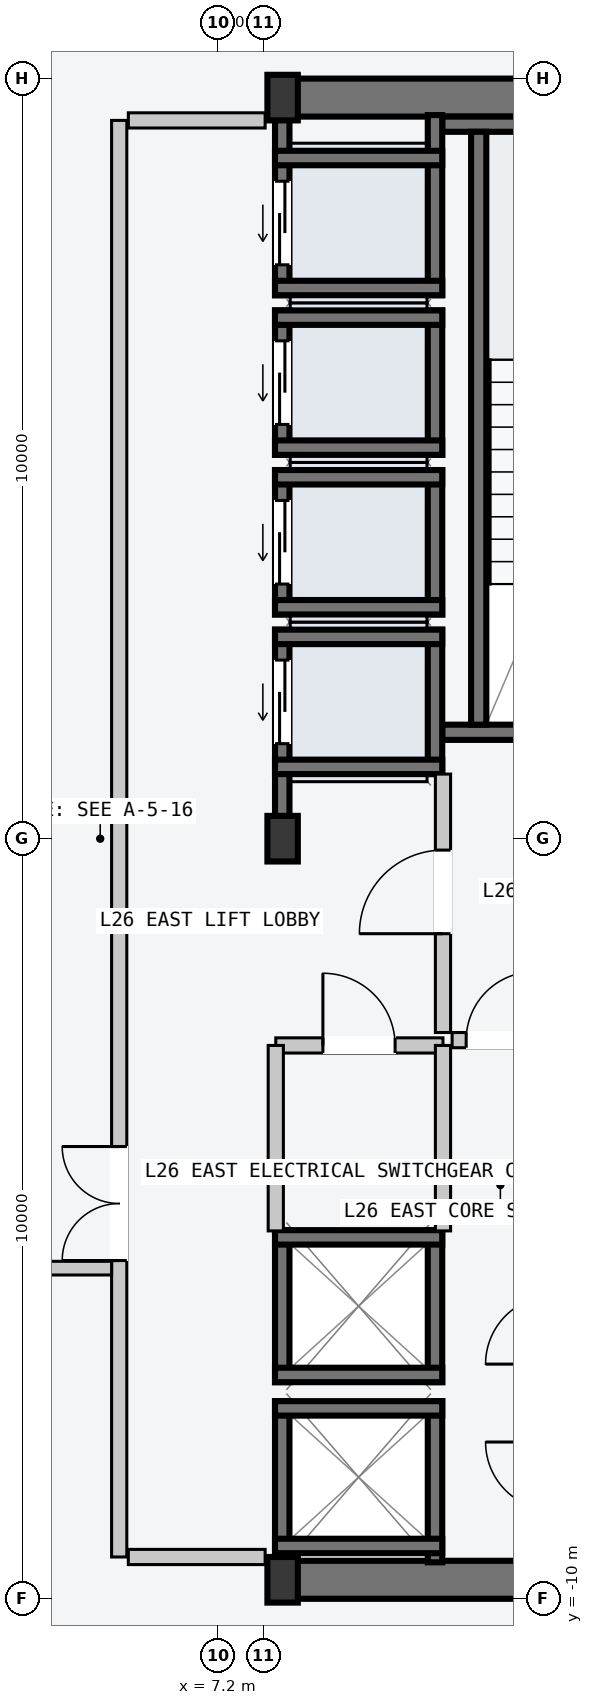
"""IFC4 building model, lengths in metres.
Left out: names, types, materials, properties, quantities, classifications, styles, units other than length and angle.
Written with IfcOpenShell. Run it as: python <this file> out.ifc"""

import sys

from ifc_helpers import new_model, si_unit, direction, frame, frame_2d, origin, origin_2d, place, context, subcontext, project, spatial, rectangle, i_section, extrude, element, fill, save


model = new_model("IFC4")
c1 = context("Model", 3, precision=1e-05, world=origin(), true_north=direction((0.0, 1.0)))
c2 = subcontext(c1, "Body", "Model", "MODEL_VIEW")
j1 = project(units=[si_unit("LENGTHUNIT", "METRE"), si_unit("PLANEANGLEUNIT", "RADIAN")], contexts=[c1])
p1 = place(None, origin())
s1 = spatial("IfcSite", under=j1, at=p1, CompositionType="ELEMENT")
p2 = place(p1, origin())
s2 = spatial("IfcBuilding", under=s1, at=p2, CompositionType="ELEMENT")
p3 = place(p2, frame((0.0, 0.0, 102.6)))
s3 = spatial("IfcBuildingStorey", under=s2, at=p3, CompositionType="ELEMENT", Elevation=102.6)
for number, where, z_axis, x_axis in (
    (1, (8.07, -9.75, -0.2), (0.0, 0.0, 1.0), (1.0, 0.0, 0.0)),
    (2, (8.07, 9.75, -0.2), (0.0, 0.0, 1.0), (1.0, 0.0, 0.0)),
):
    element("IfcWall", number, at=place(p3, frame(where, z_axis=z_axis, x_axis=x_axis)), inside=s3, PredefinedType="SHEAR", context=c2, shape_type="SweptSolid", body=[
        extrude(rectangle(XDim=6.46, YDim=0.5, at=frame_2d((3.23, 0.0))), origin(), (0.0, 0.0, 1.0), 3.6),
    ])
p4 = place(p3, frame((10.15, 1.4, -0.2), z_axis=(0.0, 0.0, 1.0), x_axis=(1.0, 0.0, 0.0)))
e3 = element("IfcWall", 3, at=p4, inside=s3, PredefinedType="SOLIDWALL", context=c2, shape_type="SweptSolid", body=[
    extrude(rectangle(XDim=4.1, YDim=0.2, at=frame_2d((2.05, 0.0))), origin(), (0.0, 0.0, 1.0), 3.6),
])
p5 = place(p4, frame((1.5, 0.0, 0.2)))
e4 = element("IfcOpeningElement", 4, at=p5, cuts=e3, PredefinedType="OPENING", context=c2, shape_type="SweptSolid", body=[
    extrude(rectangle(XDim=1.12, YDim=2.18, at=frame_2d((0.56, 1.09))), frame((0.0, 0.11, 0.0), z_axis=(0.0, -1.0, 0.0), x_axis=(1.0, 0.0, 0.0)), (0.0, 0.0, 1.0), 0.22),
])
p6 = place(p3, frame((10.15, 9.4, -0.2), z_axis=(0.0, 0.0, 1.0), x_axis=(1.0, 0.0, 0.0)))
e5 = element("IfcWall", 5, at=p6, inside=s3, PredefinedType="SOLIDWALL", context=c2, shape_type="SweptSolid", body=[
    extrude(rectangle(XDim=4.1, YDim=0.2, at=frame_2d((2.05, 0.0))), origin(), (0.0, 0.0, 1.0), 3.6),
])
p7 = place(p3, frame((10.63, 1.5, -0.2), z_axis=(0.0, 0.0, 1.0), x_axis=(0.0, 1.0, 0.0)))
e6 = element("IfcWall", 6, at=p7, inside=s3, PredefinedType="SOLIDWALL", context=c2, shape_type="SweptSolid", body=[
    extrude(rectangle(XDim=7.8, YDim=0.2, at=frame_2d((3.9, 0.0))), origin(), (0.0, 0.0, 1.0), 3.6),
])
for number, where, z_axis, x_axis in (
    (7, (8.05, -9.75, 0.0), (0.0, 0.0, 1.0), (1.0, 0.0, 0.0)),
    (8, (8.05, 0.0, 0.0), (0.0, 0.0, 1.0), (1.0, 0.0, 0.0)),
    (9, (8.05, 9.75, 0.0), (0.0, 0.0, 1.0), (1.0, 0.0, 0.0)),
):
    element("IfcColumn", number, at=place(p3, frame(where, z_axis=z_axis, x_axis=x_axis)), inside=s3, PredefinedType="COLUMN", context=c2, shape_type="SweptSolid", body=[
        extrude(i_section(OverallWidth=0.4, OverallDepth=0.6, WebThickness=0.022, FlangeThickness=0.036, at=origin_2d()), origin(), (0.0, 0.0, 1.0), 3.6),
    ])
p8 = place(p3, frame((8.045, 0.21, -0.2), z_axis=(0.0, 0.0, 1.0), x_axis=(0.0, 1.0, 0.0)))
e10 = element("IfcWall", 10, at=p8, inside=s3, PredefinedType="SOLIDWALL", context=c2, shape_type="SweptSolid", body=[
    extrude(rectangle(XDim=2.54, YDim=0.19, at=frame_2d((1.27, 0.0))), origin(), (0.0, 0.0, 1.0), 3.6),
])
p9 = place(p8, frame((1.04, 0.0, 0.2)))
e11 = element("IfcOpeningElement", 11, at=p9, cuts=e10, PredefinedType="OPENING", context=c2, shape_type="SweptSolid", body=[
    extrude(rectangle(XDim=1.1, YDim=2.2, at=frame_2d((0.55, 1.1))), frame((0.0, 0.105, 0.0), z_axis=(0.0, -1.0, 0.0), x_axis=(1.0, 0.0, 0.0)), (0.0, 0.0, 1.0), 0.21),
])
p10 = place(p3, frame((10.055, 0.85, -0.2), z_axis=(0.0, 0.0, 1.0), x_axis=(0.0, 1.0, 0.0)))
e12 = element("IfcWall", 12, at=p10, inside=s3, PredefinedType="SOLIDWALL", context=c2, shape_type="SweptSolid", body=[
    extrude(rectangle(XDim=1.9, YDim=0.19, at=frame_2d((0.95, 0.0))), origin(), (0.0, 0.0, 1.0), 3.6),
])
for number, where, z_axis, x_axis in (
    (13, (7.95, 2.655, -0.2), (0.0, 0.0, 1.0), (1.0, 0.0, 0.0)),
    (14, (7.95, 0.945, -0.2), (0.0, 0.0, 1.0), (1.0, 0.0, 0.0)),
):
    element("IfcWall", number, at=place(p3, frame(where, z_axis=z_axis, x_axis=x_axis)), inside=s3, PredefinedType="SOLIDWALL", context=c2, shape_type="SweptSolid", body=[
        extrude(rectangle(XDim=2.2, YDim=0.19, at=frame_2d((1.1, 0.0))), origin(), (0.0, 0.0, 1.0), 3.6),
    ])
p11 = place(p3, frame((8.045, 2.95, -0.2), z_axis=(0.0, 0.0, 1.0), x_axis=(0.0, 1.0, 0.0)))
e15 = element("IfcWall", 15, at=p11, inside=s3, PredefinedType="SOLIDWALL", context=c2, shape_type="SweptSolid", body=[
    extrude(rectangle(XDim=1.9, YDim=0.19, at=frame_2d((0.95, 0.0))), origin(), (0.0, 0.0, 1.0), 3.6),
])
p12 = place(p11, frame((0.4, 0.0, 0.2)))
e16 = element("IfcOpeningElement", 16, at=p12, cuts=e15, PredefinedType="OPENING", context=c2, shape_type="SweptSolid", body=[
    extrude(rectangle(XDim=1.1, YDim=2.2, at=frame_2d((0.55, 1.1))), frame((0.0, 0.105, 0.0), z_axis=(0.0, -1.0, 0.0), x_axis=(1.0, 0.0, 0.0)), (0.0, 0.0, 1.0), 0.21),
])
p13 = place(p3, frame((10.055, 2.95, -0.2), z_axis=(0.0, 0.0, 1.0), x_axis=(0.0, 1.0, 0.0)))
e17 = element("IfcWall", 17, at=p13, inside=s3, PredefinedType="SOLIDWALL", context=c2, shape_type="SweptSolid", body=[
    extrude(rectangle(XDim=1.9, YDim=0.19, at=frame_2d((0.95, 0.0))), origin(), (0.0, 0.0, 1.0), 3.6),
])
for number, where, z_axis, x_axis in (
    (18, (7.95, 4.755, -0.2), (0.0, 0.0, 1.0), (1.0, 0.0, 0.0)),
    (19, (7.95, 3.045, -0.2), (0.0, 0.0, 1.0), (1.0, 0.0, 0.0)),
):
    element("IfcWall", number, at=place(p3, frame(where, z_axis=z_axis, x_axis=x_axis)), inside=s3, PredefinedType="SOLIDWALL", context=c2, shape_type="SweptSolid", body=[
        extrude(rectangle(XDim=2.2, YDim=0.19, at=frame_2d((1.1, 0.0))), origin(), (0.0, 0.0, 1.0), 3.6),
    ])
p14 = place(p3, frame((8.045, 5.05, -0.2), z_axis=(0.0, 0.0, 1.0), x_axis=(0.0, 1.0, 0.0)))
e20 = element("IfcWall", 20, at=p14, inside=s3, PredefinedType="SOLIDWALL", context=c2, shape_type="SweptSolid", body=[
    extrude(rectangle(XDim=1.9, YDim=0.19, at=frame_2d((0.95, 0.0))), origin(), (0.0, 0.0, 1.0), 3.6),
])
p15 = place(p14, frame((0.4, 0.0, 0.2)))
e21 = element("IfcOpeningElement", 21, at=p15, cuts=e20, PredefinedType="OPENING", context=c2, shape_type="SweptSolid", body=[
    extrude(rectangle(XDim=1.1, YDim=2.2, at=frame_2d((0.55, 1.1))), frame((0.0, 0.105, 0.0), z_axis=(0.0, -1.0, 0.0), x_axis=(1.0, 0.0, 0.0)), (0.0, 0.0, 1.0), 0.21),
])
p16 = place(p3, frame((10.055, 5.05, -0.2), z_axis=(0.0, 0.0, 1.0), x_axis=(0.0, 1.0, 0.0)))
e22 = element("IfcWall", 22, at=p16, inside=s3, PredefinedType="SOLIDWALL", context=c2, shape_type="SweptSolid", body=[
    extrude(rectangle(XDim=1.9, YDim=0.19, at=frame_2d((0.95, 0.0))), origin(), (0.0, 0.0, 1.0), 3.6),
])
for number, where, z_axis, x_axis in (
    (23, (7.95, 6.855, -0.2), (0.0, 0.0, 1.0), (1.0, 0.0, 0.0)),
    (24, (7.95, 5.145, -0.2), (0.0, 0.0, 1.0), (1.0, 0.0, 0.0)),
):
    element("IfcWall", number, at=place(p3, frame(where, z_axis=z_axis, x_axis=x_axis)), inside=s3, PredefinedType="SOLIDWALL", context=c2, shape_type="SweptSolid", body=[
        extrude(rectangle(XDim=2.2, YDim=0.19, at=frame_2d((1.1, 0.0))), origin(), (0.0, 0.0, 1.0), 3.6),
    ])
p17 = place(p3, frame((8.045, 7.15, -0.2), z_axis=(0.0, 0.0, 1.0), x_axis=(0.0, 1.0, 0.0)))
e25 = element("IfcWall", 25, at=p17, inside=s3, PredefinedType="SOLIDWALL", context=c2, shape_type="SweptSolid", body=[
    extrude(rectangle(XDim=2.37, YDim=0.19, at=frame_2d((1.185, 0.0))), origin(), (0.0, 0.0, 1.0), 3.6),
])
p18 = place(p17, frame((0.4, 0.0, 0.2)))
e26 = element("IfcOpeningElement", 26, at=p18, cuts=e25, PredefinedType="OPENING", context=c2, shape_type="SweptSolid", body=[
    extrude(rectangle(XDim=1.1, YDim=2.2, at=frame_2d((0.55, 1.1))), frame((0.0, 0.105, 0.0), z_axis=(0.0, -1.0, 0.0), x_axis=(1.0, 0.0, 0.0)), (0.0, 0.0, 1.0), 0.21),
])
p19 = place(p3, frame((10.055, 7.15, -0.2), z_axis=(0.0, 0.0, 1.0), x_axis=(0.0, 1.0, 0.0)))
e27 = element("IfcWall", 27, at=p19, inside=s3, PredefinedType="SOLIDWALL", context=c2, shape_type="SweptSolid", body=[
    extrude(rectangle(XDim=2.37, YDim=0.19, at=frame_2d((1.185, 0.0))), origin(), (0.0, 0.0, 1.0), 3.6),
])
for number, where, z_axis, x_axis in (
    (28, (7.95, 8.955, -0.2), (0.0, 0.0, 1.0), (1.0, 0.0, 0.0)),
    (29, (7.95, 7.245, -0.2), (0.0, 0.0, 1.0), (1.0, 0.0, 0.0)),
):
    element("IfcWall", number, at=place(p3, frame(where, z_axis=z_axis, x_axis=x_axis)), inside=s3, PredefinedType="SOLIDWALL", context=c2, shape_type="SweptSolid", body=[
        extrude(rectangle(XDim=2.2, YDim=0.19, at=frame_2d((1.1, 0.0))), origin(), (0.0, 0.0, 1.0), 3.6),
    ])
for number, where, z_axis, x_axis in (
    (30, (8.045, -9.52, -0.2), (0.0, 0.0, 1.0), (0.0, 1.0, 0.0)),
    (31, (10.055, -9.52, -0.2), (0.0, 0.0, 1.0), (0.0, 1.0, 0.0)),
):
    element("IfcWall", number, at=place(p3, frame(where, z_axis=z_axis, x_axis=x_axis)), inside=s3, PredefinedType="SOLIDWALL", context=c2, shape_type="SweptSolid", body=[
        extrude(rectangle(XDim=2.12, YDim=0.19, at=frame_2d((1.06, 0.0))), origin(), (0.0, 0.0, 1.0), 3.6),
    ])
for number, where, z_axis, x_axis in (
    (32, (7.95, -7.495, -0.2), (0.0, 0.0, 1.0), (1.0, 0.0, 0.0)),
    (33, (7.95, -9.305, -0.2), (0.0, 0.0, 1.0), (1.0, 0.0, 0.0)),
):
    element("IfcWall", number, at=place(p3, frame(where, z_axis=z_axis, x_axis=x_axis)), inside=s3, PredefinedType="SOLIDWALL", context=c2, shape_type="SweptSolid", body=[
        extrude(rectangle(XDim=2.2, YDim=0.19, at=frame_2d((1.1, 0.0))), origin(), (0.0, 0.0, 1.0), 3.6),
    ])
for number, where, z_axis, x_axis in (
    (34, (8.045, -7.15, -0.2), (0.0, 0.0, 1.0), (0.0, 1.0, 0.0)),
    (35, (10.055, -7.15, -0.2), (0.0, 0.0, 1.0), (0.0, 1.0, 0.0)),
):
    element("IfcWall", number, at=place(p3, frame(where, z_axis=z_axis, x_axis=x_axis)), inside=s3, PredefinedType="SOLIDWALL", context=c2, shape_type="SweptSolid", body=[
        extrude(rectangle(XDim=2.0, YDim=0.19, at=frame_2d((1.0, 0.0))), origin(), (0.0, 0.0, 1.0), 3.6),
    ])
for number, where, z_axis, x_axis in (
    (36, (7.95, -5.245, -0.2), (0.0, 0.0, 1.0), (1.0, 0.0, 0.0)),
    (37, (7.95, -7.055, -0.2), (0.0, 0.0, 1.0), (1.0, 0.0, 0.0)),
):
    element("IfcWall", number, at=place(p3, frame(where, z_axis=z_axis, x_axis=x_axis)), inside=s3, PredefinedType="SOLIDWALL", context=c2, shape_type="SweptSolid", body=[
        extrude(rectangle(XDim=2.2, YDim=0.19, at=frame_2d((1.1, 0.0))), origin(), (0.0, 0.0, 1.0), 3.6),
    ])
p20 = place(p3, frame((5.9, -9.45, 0.0), z_axis=(0.0, 0.0, 1.0), x_axis=(0.0, 1.0, 0.0)))
e38 = element("IfcWall", 38, at=p20, inside=s3, PredefinedType="PARTITIONING", context=c2, shape_type="SweptSolid", body=[
    extrude(rectangle(XDim=18.9, YDim=0.2, at=frame_2d((9.45, 0.0))), origin(), (0.0, 0.0, 1.0), 3.4),
])
p21 = place(p20, frame((3.9, 0.0, 0.0)))
e39 = element("IfcOpeningElement", 39, at=p21, cuts=e38, PredefinedType="OPENING", context=c2, shape_type="SweptSolid", body=[
    extrude(rectangle(XDim=1.5, YDim=2.2, at=frame_2d((0.75, 1.1))), frame((0.0, 0.11, 0.0), z_axis=(0.0, -1.0, 0.0), x_axis=(1.0, 0.0, 0.0)), (0.0, 0.0, 1.0), 0.22),
])
for number, where, z_axis, x_axis in (
    (40, (6.02, -9.45, 0.0), (0.0, 0.0, 1.0), (1.0, 0.0, 0.0)),
    (41, (6.02, 9.45, 0.0), (0.0, 0.0, 1.0), (1.0, 0.0, 0.0)),
):
    element("IfcWall", number, at=place(p3, frame(where, z_axis=z_axis, x_axis=x_axis)), inside=s3, PredefinedType="PARTITIONING", context=c2, shape_type="SweptSolid", body=[
        extrude(rectangle(XDim=1.8, YDim=0.2, at=frame_2d((0.9, 0.0))), origin(), (0.0, 0.0, 1.0), 3.4),
    ])
p22 = place(p3, frame((10.16, -2.55, 0.0), z_axis=(0.0, 0.0, 1.0), x_axis=(0.0, 1.0, 0.0)))
e42 = element("IfcWall", 42, at=p22, inside=s3, PredefinedType="PARTITIONING", context=c2, shape_type="SweptSolid", body=[
    extrude(rectangle(XDim=3.4, YDim=0.2, at=frame_2d((1.7, 0.0))), origin(), (0.0, 0.0, 1.0), 3.4),
])
p23 = place(p22, frame((1.3, 0.0, 0.0)))
e43 = element("IfcOpeningElement", 43, at=p23, cuts=e42, PredefinedType="OPENING", context=c2, shape_type="SweptSolid", body=[
    extrude(rectangle(XDim=1.1, YDim=2.15, at=frame_2d((0.55, 1.075))), frame((0.0, 0.11, 0.0), z_axis=(0.0, -1.0, 0.0), x_axis=(1.0, 0.0, 0.0)), (0.0, 0.0, 1.0), 0.22),
])
p24 = place(p3, frame((10.28, -2.65, 0.0), z_axis=(0.0, 0.0, 1.0), x_axis=(1.0, 0.0, 0.0)))
e44 = element("IfcWall", 44, at=p24, inside=s3, PredefinedType="PARTITIONING", context=c2, shape_type="SweptSolid", body=[
    extrude(rectangle(XDim=1.27, YDim=0.2, at=frame_2d((0.635, 0.0))), origin(), (0.0, 0.0, 1.0), 3.4),
])
p25 = place(p24, frame((0.185, 0.0, 0.0)))
e45 = element("IfcOpeningElement", 45, at=p25, cuts=e44, PredefinedType="OPENING", context=c2, shape_type="SweptSolid", body=[
    extrude(rectangle(XDim=0.9, YDim=2.15, at=frame_2d((0.45, 1.075))), frame((0.0, 0.11, 0.0), z_axis=(0.0, -1.0, 0.0), x_axis=(1.0, 0.0, 0.0)), (0.0, 0.0, 1.0), 0.22),
])
p26 = place(p3, frame((7.96, -2.72, 0.0), z_axis=(0.0, 0.0, 1.0), x_axis=(1.0, 0.0, 0.0)))
e46 = element("IfcWall", 46, at=p26, inside=s3, PredefinedType="PARTITIONING", context=c2, shape_type="SweptSolid", body=[
    extrude(rectangle(XDim=2.2, YDim=0.2, at=frame_2d((1.1, 0.0))), origin(), (0.0, 0.0, 1.0), 3.4),
])
p27 = place(p26, frame((0.62, 0.0, 0.0)))
e47 = element("IfcOpeningElement", 47, at=p27, cuts=e46, PredefinedType="OPENING", context=c2, shape_type="SweptSolid", body=[
    extrude(rectangle(XDim=0.95, YDim=2.1, at=frame_2d((0.475, 1.05))), frame((0.0, 0.11, 0.0), z_axis=(0.0, -1.0, 0.0), x_axis=(1.0, 0.0, 0.0)), (0.0, 0.0, 1.0), 0.22),
])
for number, where, z_axis, x_axis in (
    (48, (7.96, -5.16, 0.0), (0.0, 0.0, 1.0), (0.0, 1.0, 0.0)),
    (49, (10.16, -5.16, 0.0), (0.0, 0.0, 1.0), (0.0, 1.0, 0.0)),
):
    element("IfcWall", number, at=place(p3, frame(where, z_axis=z_axis, x_axis=x_axis)), inside=s3, PredefinedType="PARTITIONING", context=c2, shape_type="SweptSolid", body=[
        extrude(rectangle(XDim=2.44, YDim=0.2, at=frame_2d((1.22, 0.0))), origin(), (0.0, 0.0, 1.0), 3.4),
    ])
p28 = place(p3, frame((-5.8, -5.65, 0.0), z_axis=(0.0, 0.0, 1.0), x_axis=(1.0, 0.0, 0.0)))
e50 = element("IfcWall", 50, at=p28, inside=s3, PredefinedType="PARTITIONING", context=c2, shape_type="SweptSolid", body=[
    extrude(rectangle(XDim=11.6, YDim=0.18, at=frame_2d((5.8, 0.0))), origin(), (0.0, 0.0, 1.0), 3.4),
])
p29 = place(p28, frame((5.1, 0.0, 0.0)))
e51 = element("IfcOpeningElement", 51, at=p29, cuts=e50, PredefinedType="OPENING", context=c2, shape_type="SweptSolid", body=[
    extrude(rectangle(XDim=1.4, YDim=2.2, at=frame_2d((0.7, 1.1))), frame((0.0, 0.1, 0.0), z_axis=(0.0, -1.0, 0.0), x_axis=(1.0, 0.0, 0.0)), (0.0, 0.0, 1.0), 0.2),
])
p30 = place(p9, origin())
e52 = element("IfcDoor", 52, at=p30, inside=s3, OperationType="SLIDING_TO_LEFT", PredefinedType="DOOR", context=c2, shape_type="SweptSolid", body=[
    extrude(rectangle(XDim=1.1, YDim=2.2, at=frame_2d((0.55, 1.1))), frame((0.0, 0.025, 0.0), z_axis=(0.0, -1.0, 0.0), x_axis=(1.0, 0.0, 0.0)), (0.0, 0.0, 1.0), 0.05),
])
fill(e11, e52)
p31 = place(p12, origin())
e53 = element("IfcDoor", 53, at=p31, inside=s3, OperationType="SLIDING_TO_LEFT", PredefinedType="DOOR", context=c2, shape_type="SweptSolid", body=[
    extrude(rectangle(XDim=1.1, YDim=2.2, at=frame_2d((0.55, 1.1))), frame((0.0, 0.025, 0.0), z_axis=(0.0, -1.0, 0.0), x_axis=(1.0, 0.0, 0.0)), (0.0, 0.0, 1.0), 0.05),
])
fill(e16, e53)
p32 = place(p15, origin())
e54 = element("IfcDoor", 54, at=p32, inside=s3, OperationType="SLIDING_TO_LEFT", PredefinedType="DOOR", context=c2, shape_type="SweptSolid", body=[
    extrude(rectangle(XDim=1.1, YDim=2.2, at=frame_2d((0.55, 1.1))), frame((0.0, 0.025, 0.0), z_axis=(0.0, -1.0, 0.0), x_axis=(1.0, 0.0, 0.0)), (0.0, 0.0, 1.0), 0.05),
])
fill(e21, e54)
p33 = place(p18, origin())
e55 = element("IfcDoor", 55, at=p33, inside=s3, OperationType="SLIDING_TO_LEFT", PredefinedType="DOOR", context=c2, shape_type="SweptSolid", body=[
    extrude(rectangle(XDim=1.1, YDim=2.2, at=frame_2d((0.55, 1.1))), frame((0.0, 0.025, 0.0), z_axis=(0.0, -1.0, 0.0), x_axis=(1.0, 0.0, 0.0)), (0.0, 0.0, 1.0), 0.05),
])
fill(e26, e55)
p34 = place(p21, origin())
e56 = element("IfcDoor", 56, at=p34, inside=s3, OperationType="DOUBLE_DOOR_SINGLE_SWING", PredefinedType="DOOR", context=c2, shape_type="SweptSolid", body=[
    extrude(rectangle(XDim=1.5, YDim=2.2, at=frame_2d((0.75, 1.1))), frame((0.0, 0.025, 0.0), z_axis=(0.0, -1.0, 0.0), x_axis=(1.0, 0.0, 0.0)), (0.0, 0.0, 1.0), 0.05),
])
fill(e39, e56)
p35 = place(p23, origin())
e57 = element("IfcDoor", 57, at=p35, inside=s3, OperationType="SINGLE_SWING_LEFT", PredefinedType="DOOR", context=c2, shape_type="SweptSolid", body=[
    extrude(rectangle(XDim=1.1, YDim=2.15, at=frame_2d((0.55, 1.075))), frame((0.0, 0.025, 0.0), z_axis=(0.0, -1.0, 0.0), x_axis=(1.0, 0.0, 0.0)), (0.0, 0.0, 1.0), 0.05),
])
fill(e43, e57)
p36 = place(p25, origin())
e58 = element("IfcDoor", 58, at=p36, inside=s3, OperationType="SINGLE_SWING_RIGHT", PredefinedType="DOOR", context=c2, shape_type="SweptSolid", body=[
    extrude(rectangle(XDim=0.9, YDim=2.15, at=frame_2d((0.45, 1.075))), frame((0.0, 0.025, 0.0), z_axis=(0.0, -1.0, 0.0), x_axis=(1.0, 0.0, 0.0)), (0.0, 0.0, 1.0), 0.05),
])
fill(e45, e58)
p37 = place(p27, origin())
e59 = element("IfcDoor", 59, at=p37, inside=s3, OperationType="SINGLE_SWING_LEFT", PredefinedType="DOOR", context=c2, shape_type="SweptSolid", body=[
    extrude(rectangle(XDim=0.95, YDim=2.1, at=frame_2d((0.475, 1.05))), frame((0.0, 0.025, 0.0), z_axis=(0.0, -1.0, 0.0), x_axis=(1.0, 0.0, 0.0)), (0.0, 0.0, 1.0), 0.05),
])
fill(e47, e59)
save(model, sys.argv[1])
